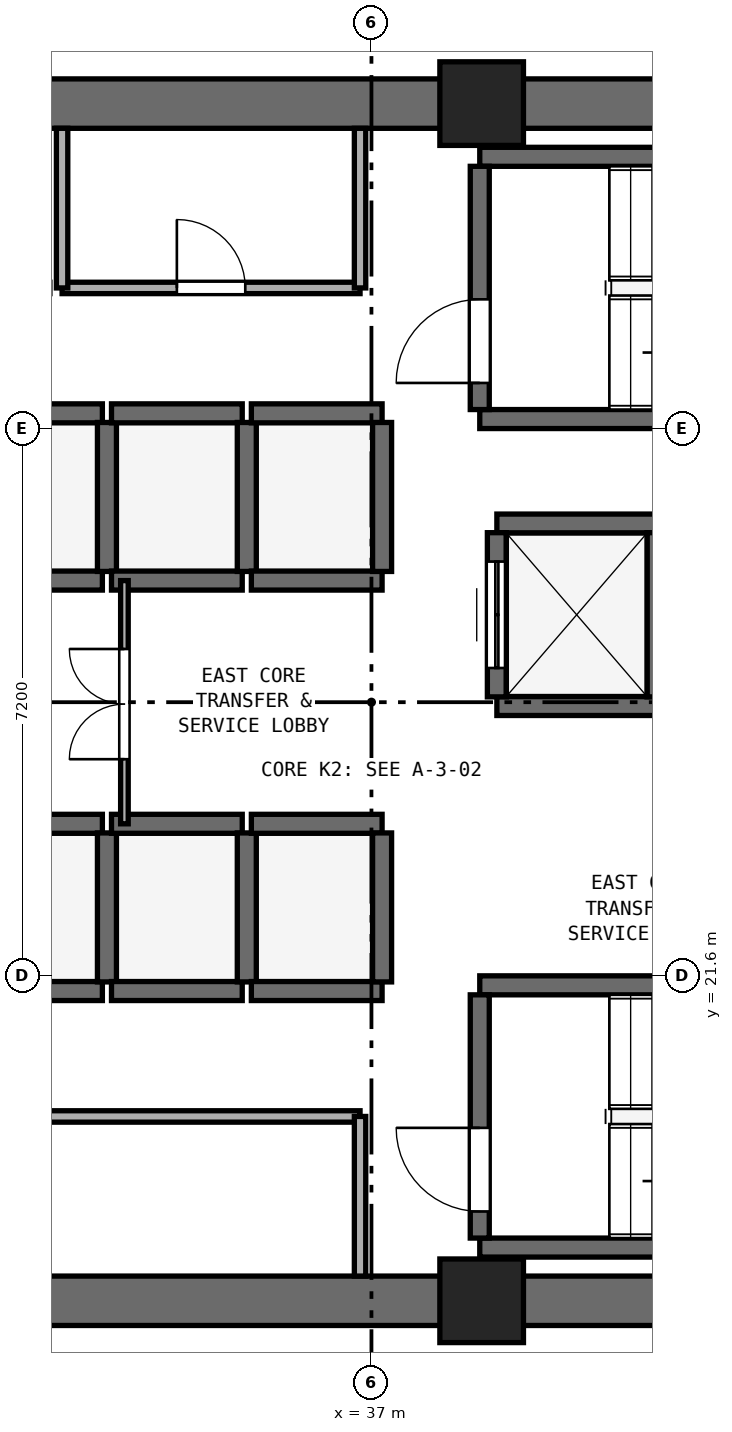
"""IFC4 building model, lengths in metres.
Left out: names, types, materials, properties, quantities, classifications, styles, units other than length and angle.
Written with IfcOpenShell. Run it as: python <this file> out.ifc"""

import sys

from ifc_helpers import new_model, si_unit, direction, frame, frame_2d, origin, origin_2d, place, context, subcontext, project, spatial, rectangle, extrude, element, fill, save


model = new_model("IFC4")
c1 = context("Model", 3, precision=1e-05, world=origin(), true_north=direction((0.0, 1.0)))
c2 = subcontext(c1, "Body", "Model", "MODEL_VIEW")
j1 = project(units=[si_unit("LENGTHUNIT", "METRE"), si_unit("PLANEANGLEUNIT", "RADIAN")], contexts=[c1])
p1 = place(None, origin())
s1 = spatial("IfcSite", under=j1, at=p1, CompositionType="ELEMENT")
p2 = place(p1, origin())
s2 = spatial("IfcBuilding", under=s1, at=p2, CompositionType="ELEMENT")
p3 = place(p2, frame((0.0, 0.0, 10.0)))
s3 = spatial("IfcBuildingStorey", under=s2, at=p3, CompositionType="ELEMENT", Elevation=10.0)
for number, where, z_axis, x_axis in (
    (1, (25.4, 17.325, 0.0), (0.0, 0.0, 1.0), (1.0, 0.0, 0.0)),
    (2, (25.4, 33.075, 0.0), (0.0, 0.0, 1.0), (1.0, 0.0, 0.0)),
):
    element("IfcWall", number, at=place(p3, frame(where, z_axis=z_axis, x_axis=x_axis)), inside=s3, PredefinedType="SHEAR", context=c2, shape_type="SweptSolid", body=[
        extrude(rectangle(XDim=23.2, YDim=0.65, at=frame_2d((11.6, 0.0))), origin(), (0.0, 0.0, 1.0), 4.68),
    ])
for number, where, z_axis, x_axis in (
    (3, (38.45, 17.325, 0.0), (0.0, 0.0, 1.0), (1.0, 0.0, 0.0)),
    (4, (38.45, 33.075, 0.0), (0.0, 0.0, 1.0), (1.0, 0.0, 0.0)),
):
    element("IfcColumn", number, at=place(p3, frame(where, z_axis=z_axis, x_axis=x_axis)), inside=s3, PredefinedType="PILASTER", context=c2, shape_type="SweptSolid", body=[
        extrude(rectangle(XDim=1.1, YDim=1.1, at=origin_2d()), origin(), (0.0, 0.0, 1.0), 5.0),
    ])
for number, where, z_axis, x_axis in (
    (5, (38.425, 28.925, 0.0), (0.0, 0.0, 1.0), (1.0, 0.0, 0.0)),
    (6, (38.425, 32.375, 0.0), (0.0, 0.0, 1.0), (1.0, 0.0, 0.0)),
):
    element("IfcWall", number, at=place(p3, frame(where, z_axis=z_axis, x_axis=x_axis)), inside=s3, PredefinedType="SHEAR", context=c2, shape_type="SweptSolid", body=[
        extrude(rectangle(XDim=7.3, YDim=0.25, at=frame_2d((3.65, 0.0))), origin(), (0.0, 0.0, 1.0), 4.68),
    ])
p4 = place(p3, frame((38.425, 29.05, 0.0), z_axis=(0.0, 0.0, 1.0), x_axis=(0.0, 1.0, 0.0)))
e7 = element("IfcWall", 7, at=p4, inside=s3, PredefinedType="SHEAR", context=c2, shape_type="SweptSolid", body=[
    extrude(rectangle(XDim=3.2, YDim=0.25, at=frame_2d((1.6, 0.0))), origin(), (0.0, 0.0, 1.0), 4.68),
])
p5 = place(p4, frame((0.35, 0.0, 0.0)))
e8 = element("IfcOpeningElement", 8, at=p5, cuts=e7, PredefinedType="OPENING", context=c2, shape_type="SweptSolid", body=[
    extrude(rectangle(XDim=1.1, YDim=2.15, at=frame_2d((0.55, 1.075))), frame((0.0, 0.135, 0.0), z_axis=(0.0, -1.0, 0.0), x_axis=(1.0, 0.0, 0.0)), (0.0, 0.0, 1.0), 0.27),
])
for number, where, z_axis, x_axis in (
    (9, (38.425, 18.025, 0.0), (0.0, 0.0, 1.0), (1.0, 0.0, 0.0)),
    (10, (38.425, 21.475, 0.0), (0.0, 0.0, 1.0), (1.0, 0.0, 0.0)),
):
    element("IfcWall", number, at=place(p3, frame(where, z_axis=z_axis, x_axis=x_axis)), inside=s3, PredefinedType="SHEAR", context=c2, shape_type="SweptSolid", body=[
        extrude(rectangle(XDim=7.3, YDim=0.25, at=frame_2d((3.65, 0.0))), origin(), (0.0, 0.0, 1.0), 4.68),
    ])
p6 = place(p3, frame((38.425, 18.15, 0.0), z_axis=(0.0, 0.0, 1.0), x_axis=(0.0, 1.0, 0.0)))
e11 = element("IfcWall", 11, at=p6, inside=s3, PredefinedType="SHEAR", context=c2, shape_type="SweptSolid", body=[
    extrude(rectangle(XDim=3.2, YDim=0.25, at=frame_2d((1.6, 0.0))), origin(), (0.0, 0.0, 1.0), 4.68),
])
p7 = place(p6, frame((0.35, 0.0, 0.0)))
e12 = element("IfcOpeningElement", 12, at=p7, cuts=e11, PredefinedType="OPENING", context=c2, shape_type="SweptSolid", body=[
    extrude(rectangle(XDim=1.1, YDim=2.15, at=frame_2d((0.55, 1.075))), frame((0.0, 0.135, 0.0), z_axis=(0.0, -1.0, 0.0), x_axis=(1.0, 0.0, 0.0)), (0.0, 0.0, 1.0), 0.27),
])
for number, where, z_axis, x_axis in (
    (13, (31.74, 21.4, 0.0), (0.0, 0.0, 1.0), (1.0, 0.0, 0.0)),
    (14, (31.74, 23.6, 0.0), (0.0, 0.0, 1.0), (1.0, 0.0, 0.0)),
):
    element("IfcWall", number, at=place(p3, frame(where, z_axis=z_axis, x_axis=x_axis)), inside=s3, PredefinedType="SHEAR", context=c2, shape_type="SweptSolid", body=[
        extrude(rectangle(XDim=1.72, YDim=0.25, at=frame_2d((0.86, 0.0))), origin(), (0.0, 0.0, 1.0), 4.68),
    ])
p8 = place(p3, frame((33.52, 21.52, 0.0), z_axis=(0.0, 0.0, 1.0), x_axis=(0.0, 1.0, 0.0)))
e15 = element("IfcWall", 15, at=p8, inside=s3, PredefinedType="SHEAR", context=c2, shape_type="SweptSolid", body=[
    extrude(rectangle(XDim=1.96, YDim=0.25, at=frame_2d((0.98, 0.0))), origin(), (0.0, 0.0, 1.0), 4.68),
])
for number, where, z_axis, x_axis in (
    (16, (33.58, 21.4, 0.0), (0.0, 0.0, 1.0), (1.0, 0.0, 0.0)),
    (17, (33.58, 23.6, 0.0), (0.0, 0.0, 1.0), (1.0, 0.0, 0.0)),
):
    element("IfcWall", number, at=place(p3, frame(where, z_axis=z_axis, x_axis=x_axis)), inside=s3, PredefinedType="SHEAR", context=c2, shape_type="SweptSolid", body=[
        extrude(rectangle(XDim=1.72, YDim=0.25, at=frame_2d((0.86, 0.0))), origin(), (0.0, 0.0, 1.0), 4.68),
    ])
p9 = place(p3, frame((35.36, 21.52, 0.0), z_axis=(0.0, 0.0, 1.0), x_axis=(0.0, 1.0, 0.0)))
e18 = element("IfcWall", 18, at=p9, inside=s3, PredefinedType="SHEAR", context=c2, shape_type="SweptSolid", body=[
    extrude(rectangle(XDim=1.96, YDim=0.25, at=frame_2d((0.98, 0.0))), origin(), (0.0, 0.0, 1.0), 4.68),
])
for number, where, z_axis, x_axis in (
    (19, (35.42, 21.4, 0.0), (0.0, 0.0, 1.0), (1.0, 0.0, 0.0)),
    (20, (35.42, 23.6, 0.0), (0.0, 0.0, 1.0), (1.0, 0.0, 0.0)),
):
    element("IfcWall", number, at=place(p3, frame(where, z_axis=z_axis, x_axis=x_axis)), inside=s3, PredefinedType="SHEAR", context=c2, shape_type="SweptSolid", body=[
        extrude(rectangle(XDim=1.72, YDim=0.25, at=frame_2d((0.86, 0.0))), origin(), (0.0, 0.0, 1.0), 4.68),
    ])
p10 = place(p3, frame((37.14, 21.52, 0.0), z_axis=(0.0, 0.0, 1.0), x_axis=(0.0, 1.0, 0.0)))
e21 = element("IfcWall", 21, at=p10, inside=s3, PredefinedType="SHEAR", context=c2, shape_type="SweptSolid", body=[
    extrude(rectangle(XDim=1.96, YDim=0.25, at=frame_2d((0.98, 0.0))), origin(), (0.0, 0.0, 1.0), 4.68),
])
for number, where, z_axis, x_axis in (
    (22, (31.74, 26.8, 0.0), (0.0, 0.0, 1.0), (1.0, 0.0, 0.0)),
    (23, (31.74, 29.0, 0.0), (0.0, 0.0, 1.0), (1.0, 0.0, 0.0)),
):
    element("IfcWall", number, at=place(p3, frame(where, z_axis=z_axis, x_axis=x_axis)), inside=s3, PredefinedType="SHEAR", context=c2, shape_type="SweptSolid", body=[
        extrude(rectangle(XDim=1.72, YDim=0.25, at=frame_2d((0.86, 0.0))), origin(), (0.0, 0.0, 1.0), 4.68),
    ])
p11 = place(p3, frame((33.52, 26.92, 0.0), z_axis=(0.0, 0.0, 1.0), x_axis=(0.0, 1.0, 0.0)))
e24 = element("IfcWall", 24, at=p11, inside=s3, PredefinedType="SHEAR", context=c2, shape_type="SweptSolid", body=[
    extrude(rectangle(XDim=1.96, YDim=0.25, at=frame_2d((0.98, 0.0))), origin(), (0.0, 0.0, 1.0), 4.68),
])
for number, where, z_axis, x_axis in (
    (25, (33.58, 26.8, 0.0), (0.0, 0.0, 1.0), (1.0, 0.0, 0.0)),
    (26, (33.58, 29.0, 0.0), (0.0, 0.0, 1.0), (1.0, 0.0, 0.0)),
):
    element("IfcWall", number, at=place(p3, frame(where, z_axis=z_axis, x_axis=x_axis)), inside=s3, PredefinedType="SHEAR", context=c2, shape_type="SweptSolid", body=[
        extrude(rectangle(XDim=1.72, YDim=0.25, at=frame_2d((0.86, 0.0))), origin(), (0.0, 0.0, 1.0), 4.68),
    ])
p12 = place(p3, frame((35.36, 26.92, 0.0), z_axis=(0.0, 0.0, 1.0), x_axis=(0.0, 1.0, 0.0)))
e27 = element("IfcWall", 27, at=p12, inside=s3, PredefinedType="SHEAR", context=c2, shape_type="SweptSolid", body=[
    extrude(rectangle(XDim=1.96, YDim=0.25, at=frame_2d((0.98, 0.0))), origin(), (0.0, 0.0, 1.0), 4.68),
])
for number, where, z_axis, x_axis in (
    (28, (35.42, 26.8, 0.0), (0.0, 0.0, 1.0), (1.0, 0.0, 0.0)),
    (29, (35.42, 29.0, 0.0), (0.0, 0.0, 1.0), (1.0, 0.0, 0.0)),
):
    element("IfcWall", number, at=place(p3, frame(where, z_axis=z_axis, x_axis=x_axis)), inside=s3, PredefinedType="SHEAR", context=c2, shape_type="SweptSolid", body=[
        extrude(rectangle(XDim=1.72, YDim=0.25, at=frame_2d((0.86, 0.0))), origin(), (0.0, 0.0, 1.0), 4.68),
    ])
p13 = place(p3, frame((37.14, 26.92, 0.0), z_axis=(0.0, 0.0, 1.0), x_axis=(0.0, 1.0, 0.0)))
e30 = element("IfcWall", 30, at=p13, inside=s3, PredefinedType="SHEAR", context=c2, shape_type="SweptSolid", body=[
    extrude(rectangle(XDim=1.96, YDim=0.25, at=frame_2d((0.98, 0.0))), origin(), (0.0, 0.0, 1.0), 4.68),
])
for number, where, z_axis, x_axis in (
    (31, (38.65, 25.15, 0.0), (0.0, 0.0, 1.0), (1.0, 0.0, 0.0)),
    (32, (38.65, 27.55, 0.0), (0.0, 0.0, 1.0), (1.0, 0.0, 0.0)),
):
    element("IfcWall", number, at=place(p3, frame(where, z_axis=z_axis, x_axis=x_axis)), inside=s3, PredefinedType="SHEAR", context=c2, shape_type="SweptSolid", body=[
        extrude(rectangle(XDim=2.1, YDim=0.25, at=frame_2d((1.05, 0.0))), origin(), (0.0, 0.0, 1.0), 4.68),
    ])
p14 = place(p3, frame((38.65, 25.27, 0.0), z_axis=(0.0, 0.0, 1.0), x_axis=(0.0, 1.0, 0.0)))
e33 = element("IfcWall", 33, at=p14, inside=s3, PredefinedType="SHEAR", context=c2, shape_type="SweptSolid", body=[
    extrude(rectangle(XDim=2.16, YDim=0.25, at=frame_2d((1.08, 0.0))), origin(), (0.0, 0.0, 1.0), 4.68),
])
p15 = place(p14, frame((0.38, 0.0, 0.0)))
e34 = element("IfcOpeningElement", 34, at=p15, cuts=e33, PredefinedType="OPENING", context=c2, shape_type="SweptSolid", body=[
    extrude(rectangle(XDim=1.4, YDim=2.2, at=frame_2d((0.7, 1.1))), frame((0.0, 0.135, 0.0), z_axis=(0.0, -1.0, 0.0), x_axis=(1.0, 0.0, 0.0)), (0.0, 0.0, 1.0), 0.27),
])
p16 = place(p3, frame((40.75, 25.27, 0.0), z_axis=(0.0, 0.0, 1.0), x_axis=(0.0, 1.0, 0.0)))
e35 = element("IfcWall", 35, at=p16, inside=s3, PredefinedType="SHEAR", context=c2, shape_type="SweptSolid", body=[
    extrude(rectangle(XDim=2.16, YDim=0.25, at=frame_2d((1.08, 0.0))), origin(), (0.0, 0.0, 1.0), 4.68),
])
p17 = place(p3, frame((32.93, 30.65, 0.0), z_axis=(0.0, 0.0, 1.0), x_axis=(1.0, 0.0, 0.0)))
e36 = element("IfcWall", 36, at=p17, inside=s3, PredefinedType="PARTITIONING", context=c2, shape_type="SweptSolid", body=[
    extrude(rectangle(XDim=3.92, YDim=0.15, at=frame_2d((1.96, 0.0))), origin(), (0.0, 0.0, 1.0), 4.68),
])
p18 = place(p17, frame((1.51, 0.0, 0.0)))
e37 = element("IfcOpeningElement", 37, at=p18, cuts=e36, PredefinedType="OPENING", context=c2, shape_type="SweptSolid", body=[
    extrude(rectangle(XDim=0.9, YDim=2.1, at=frame_2d((0.45, 1.05))), frame((0.0, 0.085, 0.0), z_axis=(0.0, -1.0, 0.0), x_axis=(1.0, 0.0, 0.0)), (0.0, 0.0, 1.0), 0.17),
])
for number, where, z_axis, x_axis in (
    (38, (32.93, 30.65, 0.0), (0.0, 0.0, 1.0), (0.0, 1.0, 0.0)),
    (39, (36.85, 30.65, 0.0), (0.0, 0.0, 1.0), (0.0, 1.0, 0.0)),
):
    element("IfcWall", number, at=place(p3, frame(where, z_axis=z_axis, x_axis=x_axis)), inside=s3, PredefinedType="PARTITIONING", context=c2, shape_type="SweptSolid", body=[
        extrude(rectangle(XDim=2.1, YDim=0.15, at=frame_2d((1.05, 0.0))), origin(), (0.0, 0.0, 1.0), 4.68),
    ])
p19 = place(p3, frame((26.17, 19.75, 0.0), z_axis=(0.0, 0.0, 1.0), x_axis=(1.0, 0.0, 0.0)))
e40 = element("IfcWall", 40, at=p19, inside=s3, PredefinedType="PARTITIONING", context=c2, shape_type="SweptSolid", body=[
    extrude(rectangle(XDim=10.68, YDim=0.15, at=frame_2d((5.34, 0.0))), origin(), (0.0, 0.0, 1.0), 4.68),
])
p20 = place(p19, frame((4.865, 0.0, 0.0)))
e41 = element("IfcOpeningElement", 41, at=p20, cuts=e40, PredefinedType="OPENING", context=c2, shape_type="SweptSolid", body=[
    extrude(rectangle(XDim=0.95, YDim=2.1, at=frame_2d((0.475, 1.05))), frame((0.0, 0.085, 0.0), z_axis=(0.0, -1.0, 0.0), x_axis=(1.0, 0.0, 0.0)), (0.0, 0.0, 1.0), 0.17),
])
p21 = place(p3, frame((36.85, 17.65, 0.0), z_axis=(0.0, 0.0, 1.0), x_axis=(0.0, 1.0, 0.0)))
e42 = element("IfcWall", 42, at=p21, inside=s3, PredefinedType="PARTITIONING", context=c2, shape_type="SweptSolid", body=[
    extrude(rectangle(XDim=2.1, YDim=0.15, at=frame_2d((1.05, 0.0))), origin(), (0.0, 0.0, 1.0), 4.68),
])
p22 = place(p3, frame((33.75, 23.6, 0.0), z_axis=(0.0, 0.0, 1.0), x_axis=(0.0, 1.0, 0.0)))
e43 = element("IfcWall", 43, at=p22, inside=s3, PredefinedType="PARTITIONING", context=c2, shape_type="SweptSolid", body=[
    extrude(rectangle(XDim=3.2, YDim=0.1, at=frame_2d((1.6, 0.0))), origin(), (0.0, 0.0, 1.0), 4.68),
])
p23 = place(p22, frame((0.85, 0.0, 0.0)))
e44 = element("IfcOpeningElement", 44, at=p23, cuts=e43, PredefinedType="OPENING", context=c2, shape_type="SweptSolid", body=[
    extrude(rectangle(XDim=1.45, YDim=2.12, at=frame_2d((0.725, 1.06))), frame((0.0, 0.06, 0.0), z_axis=(0.0, -1.0, 0.0), x_axis=(1.0, 0.0, 0.0)), (0.0, 0.0, 1.0), 0.12),
])
p24 = place(p5, origin())
e45 = element("IfcDoor", 45, at=p24, inside=s3, OperationType="SINGLE_SWING_LEFT", PredefinedType="DOOR", context=c2, shape_type="SweptSolid", body=[
    extrude(rectangle(XDim=1.1, YDim=2.15, at=frame_2d((0.55, 1.075))), frame((0.0, 0.025, 0.0), z_axis=(0.0, -1.0, 0.0), x_axis=(1.0, 0.0, 0.0)), (0.0, 0.0, 1.0), 0.05),
])
fill(e8, e45)
p25 = place(p7, origin())
e46 = element("IfcDoor", 46, at=p25, inside=s3, OperationType="SINGLE_SWING_RIGHT", PredefinedType="DOOR", context=c2, shape_type="SweptSolid", body=[
    extrude(rectangle(XDim=1.1, YDim=2.15, at=frame_2d((0.55, 1.075))), frame((0.0, 0.025, 0.0), z_axis=(0.0, -1.0, 0.0), x_axis=(1.0, 0.0, 0.0)), (0.0, 0.0, 1.0), 0.05),
])
fill(e12, e46)
p26 = place(p15, origin())
e47 = element("IfcDoor", 47, at=p26, inside=s3, OperationType="DOUBLE_DOOR_SLIDING", PredefinedType="DOOR", context=c2, shape_type="SweptSolid", body=[
    extrude(rectangle(XDim=1.4, YDim=2.2, at=frame_2d((0.7, 1.1))), frame((0.0, 0.025, 0.0), z_axis=(0.0, -1.0, 0.0), x_axis=(1.0, 0.0, 0.0)), (0.0, 0.0, 1.0), 0.05),
])
fill(e34, e47)
p27 = place(p18, origin())
e48 = element("IfcDoor", 48, at=p27, inside=s3, OperationType="SINGLE_SWING_LEFT", PredefinedType="DOOR", context=c2, shape_type="SweptSolid", body=[
    extrude(rectangle(XDim=0.9, YDim=2.1, at=frame_2d((0.45, 1.05))), frame((0.0, 0.025, 0.0), z_axis=(0.0, -1.0, 0.0), x_axis=(1.0, 0.0, 0.0)), (0.0, 0.0, 1.0), 0.05),
])
fill(e37, e48)
p28 = place(p23, origin())
e49 = element("IfcDoor", 49, at=p28, inside=s3, OperationType="DOUBLE_DOOR_SINGLE_SWING", PredefinedType="DOOR", context=c2, shape_type="SweptSolid", body=[
    extrude(rectangle(XDim=1.45, YDim=2.12, at=frame_2d((0.725, 1.06))), frame((0.0, 0.025, 0.0), z_axis=(0.0, -1.0, 0.0), x_axis=(1.0, 0.0, 0.0)), (0.0, 0.0, 1.0), 0.05),
])
fill(e44, e49)
save(model, sys.argv[1])
